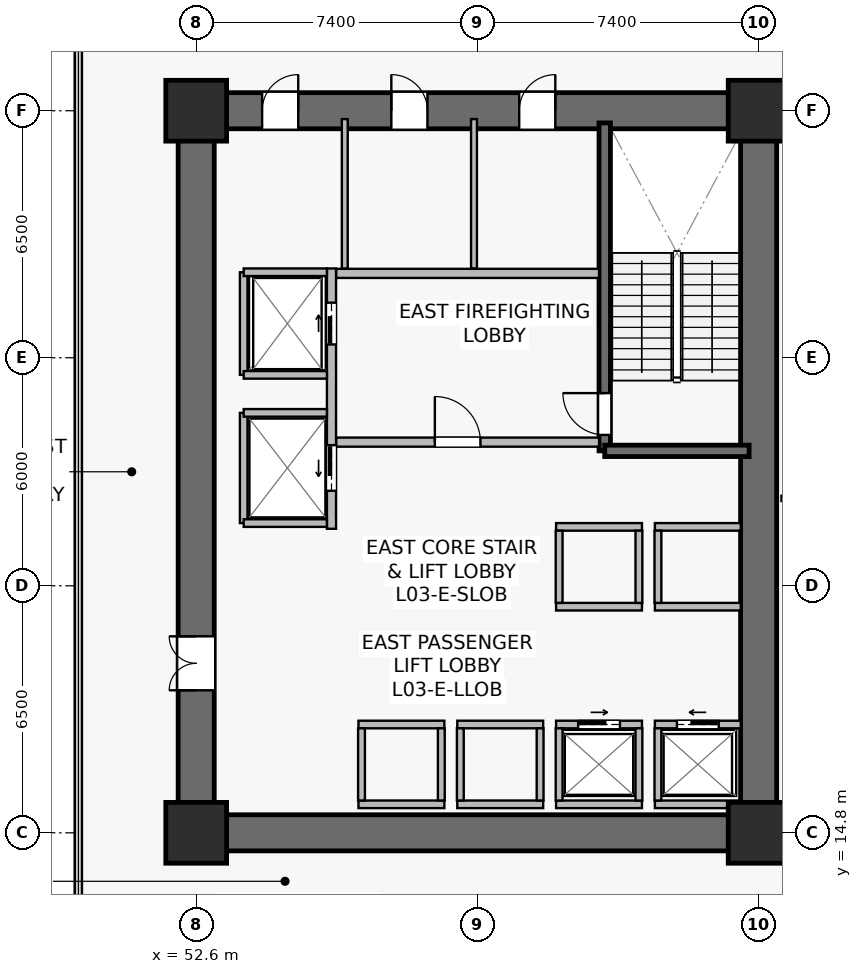
"""IFC4 building model, lengths in metres.
Left out: names, types, materials, properties, quantities, classifications, styles, units other than length and angle.
Written with IfcOpenShell. Run it as: python <this file> out.ifc"""

import sys

from ifc_helpers import new_model, si_unit, direction, frame, frame_2d, origin, origin_2d, place, context, subcontext, project, spatial, rectangle, extrude, source, transform, mapped, element, fill, save


model = new_model("IFC4")
c1 = context("Model", 3, precision=1e-05, world=origin(), true_north=direction((0.0, 1.0)))
c2 = subcontext(c1, "Body", "Model", "MODEL_VIEW")
j1 = project(units=[si_unit("LENGTHUNIT", "METRE"), si_unit("PLANEANGLEUNIT", "RADIAN")], contexts=[c1])
p1 = place(None, origin())
s1 = spatial("IfcSite", under=j1, at=p1, CompositionType="ELEMENT")
p2 = place(p1, origin())
s2 = spatial("IfcBuilding", under=s1, at=p2, CompositionType="ELEMENT")
p3 = place(p2, frame((0.0, 0.0, 10.2)))
s3 = spatial("IfcBuildingStorey", under=s2, at=p3, CompositionType="ELEMENT", Elevation=10.2)
p4 = place(p3, frame((52.125, 14.8, 0.0), z_axis=(0.0, 0.0, 1.0), x_axis=(1.0, 0.0, 0.0)))
e1 = element("IfcWall", 1, at=p4, inside=s3, PredefinedType="SHEAR", context=c2, shape_type="SweptSolid", body=[
    extrude(rectangle(XDim=15.75, YDim=0.95, at=frame_2d((7.875, 0.0))), origin(), (0.0, 0.0, 1.0), 4.45),
])
p5 = place(p3, frame((52.125, 33.8, 0.0), z_axis=(0.0, 0.0, 1.0), x_axis=(1.0, 0.0, 0.0)))
e2 = element("IfcWall", 2, at=p5, inside=s3, PredefinedType="SHEAR", context=c2, shape_type="SweptSolid", body=[
    extrude(rectangle(XDim=15.75, YDim=0.95, at=frame_2d((7.875, 0.0))), origin(), (0.0, 0.0, 1.0), 4.45),
])
p6 = place(p5, frame((8.975, 0.0, 0.0)))
e3 = element("IfcOpeningElement", 3, at=p6, cuts=e2, PredefinedType="OPENING", context=c2, shape_type="SweptSolid", body=[
    extrude(rectangle(XDim=0.95, YDim=2.15, at=frame_2d((0.475, 1.075))), frame((0.0, 0.485, 0.0), z_axis=(0.0, -1.0, 0.0), x_axis=(1.0, 0.0, 0.0)), (0.0, 0.0, 1.0), 0.97),
])
p7 = place(p5, frame((5.61, 0.0, 0.0)))
e4 = element("IfcOpeningElement", 4, at=p7, cuts=e2, PredefinedType="OPENING", context=c2, shape_type="SweptSolid", body=[
    extrude(rectangle(XDim=0.95, YDim=2.15, at=frame_2d((0.475, 1.075))), frame((0.0, 0.485, 0.0), z_axis=(0.0, -1.0, 0.0), x_axis=(1.0, 0.0, 0.0)), (0.0, 0.0, 1.0), 0.97),
])
p8 = place(p5, frame((2.21, 0.0, 0.0)))
e5 = element("IfcOpeningElement", 5, at=p8, cuts=e2, PredefinedType="OPENING", context=c2, shape_type="SweptSolid", body=[
    extrude(rectangle(XDim=0.95, YDim=2.15, at=frame_2d((0.475, 1.075))), frame((0.0, 0.485, 0.0), z_axis=(0.0, -1.0, 0.0), x_axis=(1.0, 0.0, 0.0)), (0.0, 0.0, 1.0), 0.97),
])
p9 = place(p3, frame((52.6, 15.275, 0.0), z_axis=(0.0, 0.0, 1.0), x_axis=(0.0, 1.0, 0.0)))
e6 = element("IfcWall", 6, at=p9, inside=s3, PredefinedType="SHEAR", context=c2, shape_type="SweptSolid", body=[
    extrude(rectangle(XDim=18.05, YDim=0.95, at=frame_2d((9.025, 0.0))), origin(), (0.0, 0.0, 1.0), 4.45),
])
p10 = place(p9, frame((3.275, 0.0, 0.0)))
e7 = element("IfcOpeningElement", 7, at=p10, cuts=e6, PredefinedType="OPENING", context=c2, shape_type="SweptSolid", body=[
    extrude(rectangle(XDim=1.42, YDim=2.2, at=frame_2d((0.71, 1.1))), frame((0.0, 0.485, 0.0), z_axis=(0.0, -1.0, 0.0), x_axis=(1.0, 0.0, 0.0)), (0.0, 0.0, 1.0), 0.97),
])
p11 = place(p3, frame((67.4, 15.275, 0.0), z_axis=(0.0, 0.0, 1.0), x_axis=(0.0, 1.0, 0.0)))
e8 = element("IfcWall", 8, at=p11, inside=s3, PredefinedType="SHEAR", context=c2, shape_type="SweptSolid", body=[
    extrude(rectangle(XDim=18.05, YDim=0.95, at=frame_2d((9.025, 0.0))), origin(), (0.0, 0.0, 1.0), 4.45),
])
p12 = place(p3, frame((63.35, 24.85, 0.0), z_axis=(0.0, 0.0, 1.0), x_axis=(0.0, 1.0, 0.0)))
e9 = element("IfcWall", 9, at=p12, inside=s3, PredefinedType="SHEAR", context=c2, shape_type="SweptSolid", body=[
    extrude(rectangle(XDim=8.63, YDim=0.3, at=frame_2d((4.315, 0.0))), origin(), (0.0, 0.0, 1.0), 4.45),
])
p13 = place(p12, frame((0.42, 0.0, 0.0)))
e10 = element("IfcOpeningElement", 10, at=p13, cuts=e9, PredefinedType="OPENING", context=c2, shape_type="SweptSolid", body=[
    extrude(rectangle(XDim=1.1, YDim=2.15, at=frame_2d((0.55, 1.075))), frame((0.0, 0.16, 0.0), z_axis=(0.0, -1.0, 0.0), x_axis=(1.0, 0.0, 0.0)), (0.0, 0.0, 1.0), 0.32),
])
p14 = place(p3, frame((63.35, 24.85, 0.0), z_axis=(0.0, 0.0, 1.0), x_axis=(1.0, 0.0, 0.0)))
e11 = element("IfcWall", 11, at=p14, inside=s3, PredefinedType="SHEAR", context=c2, shape_type="SweptSolid", body=[
    extrude(rectangle(XDim=3.8, YDim=0.3, at=frame_2d((1.9, 0.0))), origin(), (0.0, 0.0, 1.0), 4.45),
])
m1 = source(origin(), c2, "Body", "SweptSolid", [
    extrude(rectangle(XDim=1.6, YDim=1.6, at=origin_2d()), origin(), (0.0, 0.0, 1.0), 4.8),
])
for number, where, z_axis, x_axis in (
    (12, (52.6, 14.8, 0.0), (0.0, 0.0, 1.0), (1.0, 0.0, 0.0)),
    (13, (67.4, 14.8, 0.0), (0.0, 0.0, 1.0), (1.0, 0.0, 0.0)),
    (14, (52.6, 33.8, 0.0), (0.0, 0.0, 1.0), (1.0, 0.0, 0.0)),
    (15, (67.4, 33.8, 0.0), (0.0, 0.0, 1.0), (1.0, 0.0, 0.0)),
):
    element("IfcColumn", number, at=place(p3, frame(where, z_axis=z_axis, x_axis=x_axis)), inside=s3, PredefinedType="COLUMN", context=c2, shape_type="MappedRepresentation", body=[
        mapped(m1, transform((0.0, 0.0, 0.0), scale=1.0)),
    ])
p15 = place(p3, frame((56.28, 25.08, 0.0), z_axis=(0.0, 0.0, 1.0), x_axis=(1.0, 0.0, 0.0)))
e16 = element("IfcWall", 16, at=p15, inside=s3, PredefinedType="SOLIDWALL", context=c2, shape_type="SweptSolid", body=[
    extrude(rectangle(XDim=6.92, YDim=0.24, at=frame_2d((3.46, 0.0))), origin(), (0.0, 0.0, 1.0), 3.735),
])
p16 = place(p15, frame((2.6, 0.0, 0.0)))
e17 = element("IfcOpeningElement", 17, at=p16, cuts=e16, PredefinedType="OPENING", context=c2, shape_type="SweptSolid", body=[
    extrude(rectangle(XDim=1.2, YDim=2.16, at=frame_2d((0.6, 1.08))), frame((0.0, 0.13, 0.0), z_axis=(0.0, -1.0, 0.0), x_axis=(1.0, 0.0, 0.0)), (0.0, 0.0, 1.0), 0.26),
])
p17 = place(p3, frame((56.28, 29.52, 0.0), z_axis=(0.0, 0.0, 1.0), x_axis=(1.0, 0.0, 0.0)))
e18 = element("IfcWall", 18, at=p17, inside=s3, PredefinedType="SOLIDWALL", context=c2, shape_type="SweptSolid", body=[
    extrude(rectangle(XDim=6.92, YDim=0.24, at=frame_2d((3.46, 0.0))), origin(), (0.0, 0.0, 1.0), 3.735),
])
p18 = place(p3, frame((56.16, 22.8, 0.0), z_axis=(0.0, 0.0, 1.0), x_axis=(0.0, 1.0, 0.0)))
e19 = element("IfcWall", 19, at=p18, inside=s3, PredefinedType="SOLIDWALL", context=c2, shape_type="SweptSolid", body=[
    extrude(rectangle(XDim=6.85, YDim=0.24, at=frame_2d((3.425, 0.0))), origin(), (0.0, 0.0, 1.0), 3.535),
])
p19 = place(p18, frame((4.85, 0.0, 0.0)))
e20 = element("IfcOpeningElement", 20, at=p19, cuts=e19, PredefinedType="OPENING", context=c2, shape_type="SweptSolid", body=[
    extrude(rectangle(XDim=1.1, YDim=2.22, at=frame_2d((0.55, 1.11))), frame((0.0, 0.13, 0.0), z_axis=(0.0, -1.0, 0.0), x_axis=(1.0, 0.0, 0.0)), (0.0, 0.0, 1.0), 0.26),
])
p20 = place(p18, frame((1.0, 0.0, 0.0)))
e21 = element("IfcOpeningElement", 21, at=p20, cuts=e19, PredefinedType="OPENING", context=c2, shape_type="SweptSolid", body=[
    extrude(rectangle(XDim=1.2, YDim=2.22, at=frame_2d((0.6, 1.11))), frame((0.0, 0.13, 0.0), z_axis=(0.0, -1.0, 0.0), x_axis=(1.0, 0.0, 0.0)), (0.0, 0.0, 1.0), 0.26),
])
p21 = place(p3, frame((64.67, 17.65, 0.0), z_axis=(0.0, 0.0, 1.0), x_axis=(1.0, 0.0, 0.0)))
e22 = element("IfcWall", 22, at=p21, inside=s3, PredefinedType="SOLIDWALL", context=c2, shape_type="SweptSolid", body=[
    extrude(rectangle(XDim=2.26, YDim=0.2, at=frame_2d((1.13, 0.0))), origin(), (0.0, 0.0, 1.0), 4.45),
])
p22 = place(p21, frame((0.58, 0.0, 0.0)))
e23 = element("IfcOpeningElement", 23, at=p22, cuts=e22, PredefinedType="OPENING", context=c2, shape_type="SweptSolid", body=[
    extrude(rectangle(XDim=1.1, YDim=2.22, at=frame_2d((0.55, 1.11))), frame((0.0, 0.11, 0.0), z_axis=(0.0, -1.0, 0.0), x_axis=(1.0, 0.0, 0.0)), (0.0, 0.0, 1.0), 0.22),
])
p23 = place(p3, frame((64.67, 15.55, 0.0), z_axis=(0.0, 0.0, 1.0), x_axis=(1.0, 0.0, 0.0)))
e24 = element("IfcWall", 24, at=p23, inside=s3, PredefinedType="SOLIDWALL", context=c2, shape_type="SweptSolid", body=[
    extrude(rectangle(XDim=2.26, YDim=0.2, at=frame_2d((1.13, 0.0))), origin(), (0.0, 0.0, 1.0), 4.45),
])
p24 = place(p3, frame((64.75, 15.65, 0.0), z_axis=(0.0, 0.0, 1.0), x_axis=(0.0, 1.0, 0.0)))
e25 = element("IfcWall", 25, at=p24, inside=s3, PredefinedType="SOLIDWALL", context=c2, shape_type="SweptSolid", body=[
    extrude(rectangle(XDim=1.9, YDim=0.18, at=frame_2d((0.95, 0.0))), origin(), (0.0, 0.0, 1.0), 4.45),
])
p25 = place(p3, frame((62.07, 17.65, 0.0), z_axis=(0.0, 0.0, 1.0), x_axis=(1.0, 0.0, 0.0)))
e26 = element("IfcWall", 26, at=p25, inside=s3, PredefinedType="SOLIDWALL", context=c2, shape_type="SweptSolid", body=[
    extrude(rectangle(XDim=2.26, YDim=0.2, at=frame_2d((1.13, 0.0))), origin(), (0.0, 0.0, 1.0), 4.45),
])
p26 = place(p25, frame((0.58, 0.0, 0.0)))
e27 = element("IfcOpeningElement", 27, at=p26, cuts=e26, PredefinedType="OPENING", context=c2, shape_type="SweptSolid", body=[
    extrude(rectangle(XDim=1.1, YDim=2.22, at=frame_2d((0.55, 1.11))), frame((0.0, 0.11, 0.0), z_axis=(0.0, -1.0, 0.0), x_axis=(1.0, 0.0, 0.0)), (0.0, 0.0, 1.0), 0.22),
])
p27 = place(p3, frame((62.07, 15.55, 0.0), z_axis=(0.0, 0.0, 1.0), x_axis=(1.0, 0.0, 0.0)))
e28 = element("IfcWall", 28, at=p27, inside=s3, PredefinedType="SOLIDWALL", context=c2, shape_type="SweptSolid", body=[
    extrude(rectangle(XDim=2.26, YDim=0.2, at=frame_2d((1.13, 0.0))), origin(), (0.0, 0.0, 1.0), 4.45),
])
for number, where, z_axis, x_axis in (
    (29, (62.15, 15.65, 0.0), (0.0, 0.0, 1.0), (0.0, 1.0, 0.0)),
    (30, (64.25, 15.65, 0.0), (0.0, 0.0, 1.0), (0.0, 1.0, 0.0)),
):
    element("IfcWall", number, at=place(p3, frame(where, z_axis=z_axis, x_axis=x_axis)), inside=s3, PredefinedType="SOLIDWALL", context=c2, shape_type="SweptSolid", body=[
        extrude(rectangle(XDim=1.9, YDim=0.18, at=frame_2d((0.95, 0.0))), origin(), (0.0, 0.0, 1.0), 4.45),
    ])
for number, where, z_axis, x_axis in (
    (31, (59.47, 17.65, 0.0), (0.0, 0.0, 1.0), (1.0, 0.0, 0.0)),
    (32, (59.47, 15.55, 0.0), (0.0, 0.0, 1.0), (1.0, 0.0, 0.0)),
):
    element("IfcWall", number, at=place(p3, frame(where, z_axis=z_axis, x_axis=x_axis)), inside=s3, PredefinedType="SOLIDWALL", context=c2, shape_type="SweptSolid", body=[
        extrude(rectangle(XDim=2.26, YDim=0.2, at=frame_2d((1.13, 0.0))), origin(), (0.0, 0.0, 1.0), 3.735),
    ])
for number, where, z_axis, x_axis in (
    (33, (59.55, 15.65, 0.0), (0.0, 0.0, 1.0), (0.0, 1.0, 0.0)),
    (34, (61.65, 15.65, 0.0), (0.0, 0.0, 1.0), (0.0, 1.0, 0.0)),
):
    element("IfcWall", number, at=place(p3, frame(where, z_axis=z_axis, x_axis=x_axis)), inside=s3, PredefinedType="SOLIDWALL", context=c2, shape_type="SweptSolid", body=[
        extrude(rectangle(XDim=1.9, YDim=0.18, at=frame_2d((0.95, 0.0))), origin(), (0.0, 0.0, 1.0), 4.45),
    ])
for number, where, z_axis, x_axis in (
    (35, (56.87, 17.65, 0.0), (0.0, 0.0, 1.0), (1.0, 0.0, 0.0)),
    (36, (56.87, 15.55, 0.0), (0.0, 0.0, 1.0), (1.0, 0.0, 0.0)),
):
    element("IfcWall", number, at=place(p3, frame(where, z_axis=z_axis, x_axis=x_axis)), inside=s3, PredefinedType="SOLIDWALL", context=c2, shape_type="SweptSolid", body=[
        extrude(rectangle(XDim=2.26, YDim=0.2, at=frame_2d((1.13, 0.0))), origin(), (0.0, 0.0, 1.0), 4.45),
    ])
for number, where, z_axis, x_axis in (
    (37, (56.95, 15.65, 0.0), (0.0, 0.0, 1.0), (0.0, 1.0, 0.0)),
    (38, (59.05, 15.65, 0.0), (0.0, 0.0, 1.0), (0.0, 1.0, 0.0)),
):
    element("IfcWall", number, at=place(p3, frame(where, z_axis=z_axis, x_axis=x_axis)), inside=s3, PredefinedType="SOLIDWALL", context=c2, shape_type="SweptSolid", body=[
        extrude(rectangle(XDim=1.9, YDim=0.18, at=frame_2d((0.95, 0.0))), origin(), (0.0, 0.0, 1.0), 4.45),
    ])
for number, where, z_axis, x_axis in (
    (39, (64.67, 20.75, 0.0), (0.0, 0.0, 1.0), (1.0, 0.0, 0.0)),
    (40, (64.67, 22.85, 0.0), (0.0, 0.0, 1.0), (1.0, 0.0, 0.0)),
):
    element("IfcWall", number, at=place(p3, frame(where, z_axis=z_axis, x_axis=x_axis)), inside=s3, PredefinedType="SOLIDWALL", context=c2, shape_type="SweptSolid", body=[
        extrude(rectangle(XDim=2.26, YDim=0.2, at=frame_2d((1.13, 0.0))), origin(), (0.0, 0.0, 1.0), 4.45),
    ])
p28 = place(p3, frame((64.75, 20.85, 0.0), z_axis=(0.0, 0.0, 1.0), x_axis=(0.0, 1.0, 0.0)))
e41 = element("IfcWall", 41, at=p28, inside=s3, PredefinedType="SOLIDWALL", context=c2, shape_type="SweptSolid", body=[
    extrude(rectangle(XDim=1.9, YDim=0.18, at=frame_2d((0.95, 0.0))), origin(), (0.0, 0.0, 1.0), 4.45),
])
for number, where, z_axis, x_axis in (
    (42, (62.07, 20.75, 0.0), (0.0, 0.0, 1.0), (1.0, 0.0, 0.0)),
    (43, (62.07, 22.85, 0.0), (0.0, 0.0, 1.0), (1.0, 0.0, 0.0)),
):
    element("IfcWall", number, at=place(p3, frame(where, z_axis=z_axis, x_axis=x_axis)), inside=s3, PredefinedType="SOLIDWALL", context=c2, shape_type="SweptSolid", body=[
        extrude(rectangle(XDim=2.26, YDim=0.2, at=frame_2d((1.13, 0.0))), origin(), (0.0, 0.0, 1.0), 4.45),
    ])
for number, where, z_axis, x_axis in (
    (44, (62.15, 20.85, 0.0), (0.0, 0.0, 1.0), (0.0, 1.0, 0.0)),
    (45, (64.25, 20.85, 0.0), (0.0, 0.0, 1.0), (0.0, 1.0, 0.0)),
):
    element("IfcWall", number, at=place(p3, frame(where, z_axis=z_axis, x_axis=x_axis)), inside=s3, PredefinedType="SOLIDWALL", context=c2, shape_type="SweptSolid", body=[
        extrude(rectangle(XDim=1.9, YDim=0.18, at=frame_2d((0.95, 0.0))), origin(), (0.0, 0.0, 1.0), 4.45),
    ])
p29 = place(p3, frame((53.85, 26.85, 0.0), z_axis=(0.0, 0.0, 1.0), x_axis=(0.0, 1.0, 0.0)))
e46 = element("IfcWall", 46, at=p29, inside=s3, PredefinedType="SOLIDWALL", context=c2, shape_type="SweptSolid", body=[
    extrude(rectangle(XDim=2.7, YDim=0.2, at=frame_2d((1.35, 0.0))), origin(), (0.0, 0.0, 1.0), 4.45),
])
p30 = place(p3, frame((53.85, 29.55, 0.0), z_axis=(0.0, 0.0, 1.0), x_axis=(1.0, 0.0, 0.0)))
e47 = element("IfcWall", 47, at=p30, inside=s3, PredefinedType="SOLIDWALL", context=c2, shape_type="SweptSolid", body=[
    extrude(rectangle(XDim=2.19, YDim=0.2, at=frame_2d((1.095, 0.0))), origin(), (0.0, 0.0, 1.0), 4.45),
])
p31 = place(p3, frame((53.85, 26.85, 0.0), z_axis=(0.0, 0.0, 1.0), x_axis=(1.0, 0.0, 0.0)))
e48 = element("IfcWall", 48, at=p31, inside=s3, PredefinedType="SOLIDWALL", context=c2, shape_type="SweptSolid", body=[
    extrude(rectangle(XDim=2.19, YDim=0.2, at=frame_2d((1.095, 0.0))), origin(), (0.0, 0.0, 1.0), 3.847),
])
p32 = place(p3, frame((53.85, 22.95, 0.0), z_axis=(0.0, 0.0, 1.0), x_axis=(0.0, 1.0, 0.0)))
e49 = element("IfcWall", 49, at=p32, inside=s3, PredefinedType="SOLIDWALL", context=c2, shape_type="SweptSolid", body=[
    extrude(rectangle(XDim=2.9, YDim=0.2, at=frame_2d((1.45, 0.0))), origin(), (0.0, 0.0, 1.0), 3.535),
])
for number, where, z_axis, x_axis in (
    (50, (53.85, 25.85, 0.0), (0.0, 0.0, 1.0), (1.0, 0.0, 0.0)),
    (51, (53.85, 22.95, 0.0), (0.0, 0.0, 1.0), (1.0, 0.0, 0.0)),
):
    element("IfcWall", number, at=place(p3, frame(where, z_axis=z_axis, x_axis=x_axis)), inside=s3, PredefinedType="SOLIDWALL", context=c2, shape_type="SweptSolid", body=[
        extrude(rectangle(XDim=2.19, YDim=0.2, at=frame_2d((1.095, 0.0))), origin(), (0.0, 0.0, 1.0), 4.45),
    ])
p33 = place(p3, frame((59.91, 29.65, 0.0), z_axis=(0.0, 0.0, 1.0), x_axis=(0.0, 1.0, 0.0)))
e52 = element("IfcWall", 52, at=p33, inside=s3, PredefinedType="PLUMBINGWALL", context=c2, shape_type="SweptSolid", body=[
    extrude(rectangle(XDim=3.93, YDim=0.155, at=frame_2d((1.965, 0.0))), origin(), (0.0, 0.0, 1.0), 3.735),
])
p34 = place(p3, frame((56.51, 29.65, 0.0), z_axis=(0.0, 0.0, 1.0), x_axis=(0.0, 1.0, 0.0)))
e53 = element("IfcWall", 53, at=p34, inside=s3, PredefinedType="PLUMBINGWALL", context=c2, shape_type="SweptSolid", body=[
    extrude(rectangle(XDim=3.93, YDim=0.155, at=frame_2d((1.965, 0.0))), origin(), (0.0, 0.0, 1.0), 4.45),
])
m2 = source(origin(), c2, "Body", "SweptSolid", [
    extrude(rectangle(XDim=1.1, YDim=2.15, at=frame_2d((0.55, 1.075))), frame((0.0, 0.025, 0.0), z_axis=(0.0, -1.0, 0.0), x_axis=(1.0, 0.0, 0.0)), (0.0, 0.0, 1.0), 0.05),
])
p35 = place(p13, origin())
e54 = element("IfcDoor", 54, at=p35, inside=s3, OperationType="SINGLE_SWING_RIGHT", PredefinedType="DOOR", context=c2, shape_type="MappedRepresentation", body=[
    mapped(m2, transform((0.0, 0.0, 0.0), scale=1.0)),
])
fill(e10, e54)
m3 = source(origin(), c2, "Body", "SweptSolid", [
    extrude(rectangle(XDim=1.2, YDim=2.16, at=frame_2d((0.6, 1.08))), frame((0.0, 0.025, 0.0), z_axis=(0.0, -1.0, 0.0), x_axis=(1.0, 0.0, 0.0)), (0.0, 0.0, 1.0), 0.05),
])
p36 = place(p16, origin())
e55 = element("IfcDoor", 55, at=p36, inside=s3, OperationType="SINGLE_SWING_LEFT", PredefinedType="DOOR", context=c2, shape_type="MappedRepresentation", body=[
    mapped(m3, transform((0.0, 0.0, 0.0), scale=1.0)),
])
fill(e17, e55)
m4 = source(origin(), c2, "Body", "SweptSolid", [
    extrude(rectangle(XDim=1.1, YDim=2.22, at=frame_2d((0.55, 1.11))), frame((0.0, 0.025, 0.0), z_axis=(0.0, -1.0, 0.0), x_axis=(1.0, 0.0, 0.0)), (0.0, 0.0, 1.0), 0.05),
])
p37 = place(p22, origin())
e56 = element("IfcDoor", 56, at=p37, inside=s3, OperationType="SLIDING_TO_LEFT", PredefinedType="USERDEFINED", context=c2, shape_type="MappedRepresentation", body=[
    mapped(m4, transform((0.0, 0.0, 0.0), scale=1.0)),
])
fill(e23, e56)
p38 = place(p26, origin())
e57 = element("IfcDoor", 57, at=p38, inside=s3, OperationType="SLIDING_TO_RIGHT", PredefinedType="USERDEFINED", context=c2, shape_type="MappedRepresentation", body=[
    mapped(m4, transform((0.0, 0.0, 0.0), scale=1.0)),
])
fill(e27, e57)
p39 = place(p19, origin())
e58 = element("IfcDoor", 58, at=p39, inside=s3, OperationType="SLIDING_TO_RIGHT", PredefinedType="USERDEFINED", context=c2, shape_type="MappedRepresentation", body=[
    mapped(m4, transform((0.0, 0.0, 0.0), scale=1.0)),
])
fill(e20, e58)
m5 = source(origin(), c2, "Body", "SweptSolid", [
    extrude(rectangle(XDim=1.2, YDim=2.22, at=frame_2d((0.6, 1.11))), frame((0.0, 0.025, 0.0), z_axis=(0.0, -1.0, 0.0), x_axis=(1.0, 0.0, 0.0)), (0.0, 0.0, 1.0), 0.05),
])
p40 = place(p20, origin())
e59 = element("IfcDoor", 59, at=p40, inside=s3, OperationType="SLIDING_TO_LEFT", PredefinedType="USERDEFINED", context=c2, shape_type="MappedRepresentation", body=[
    mapped(m5, transform((0.0, 0.0, 0.0), scale=1.0)),
])
fill(e21, e59)
m6 = source(origin(), c2, "Body", "SweptSolid", [
    extrude(rectangle(XDim=1.42, YDim=2.2, at=frame_2d((0.71, 1.1))), frame((0.0, 0.025, 0.0), z_axis=(0.0, -1.0, 0.0), x_axis=(1.0, 0.0, 0.0)), (0.0, 0.0, 1.0), 0.05),
])
p41 = place(p10, origin())
e60 = element("IfcDoor", 60, at=p41, inside=s3, OperationType="DOUBLE_DOOR_SINGLE_SWING", PredefinedType="DOOR", context=c2, shape_type="MappedRepresentation", body=[
    mapped(m6, transform((0.0, 0.0, 0.0), scale=1.0)),
])
fill(e7, e60)
m7 = source(origin(), c2, "Body", "SweptSolid", [
    extrude(rectangle(XDim=0.95, YDim=2.15, at=frame_2d((0.475, 1.075))), frame((0.0, 0.025, 0.0), z_axis=(0.0, -1.0, 0.0), x_axis=(1.0, 0.0, 0.0)), (0.0, 0.0, 1.0), 0.05),
])
p42 = place(p6, origin())
e61 = element("IfcDoor", 61, at=p42, inside=s3, OperationType="SINGLE_SWING_RIGHT", PredefinedType="DOOR", context=c2, shape_type="MappedRepresentation", body=[
    mapped(m7, transform((0.0, 0.0, 0.0), scale=1.0)),
])
fill(e3, e61)
p43 = place(p7, origin())
e62 = element("IfcDoor", 62, at=p43, inside=s3, OperationType="SINGLE_SWING_LEFT", PredefinedType="DOOR", context=c2, shape_type="MappedRepresentation", body=[
    mapped(m7, transform((0.0, 0.0, 0.0), scale=1.0)),
])
fill(e4, e62)
p44 = place(p8, origin())
e63 = element("IfcDoor", 63, at=p44, inside=s3, OperationType="SINGLE_SWING_RIGHT", PredefinedType="DOOR", context=c2, shape_type="MappedRepresentation", body=[
    mapped(m7, transform((0.0, 0.0, 0.0), scale=1.0)),
])
fill(e5, e63)
save(model, sys.argv[1])
